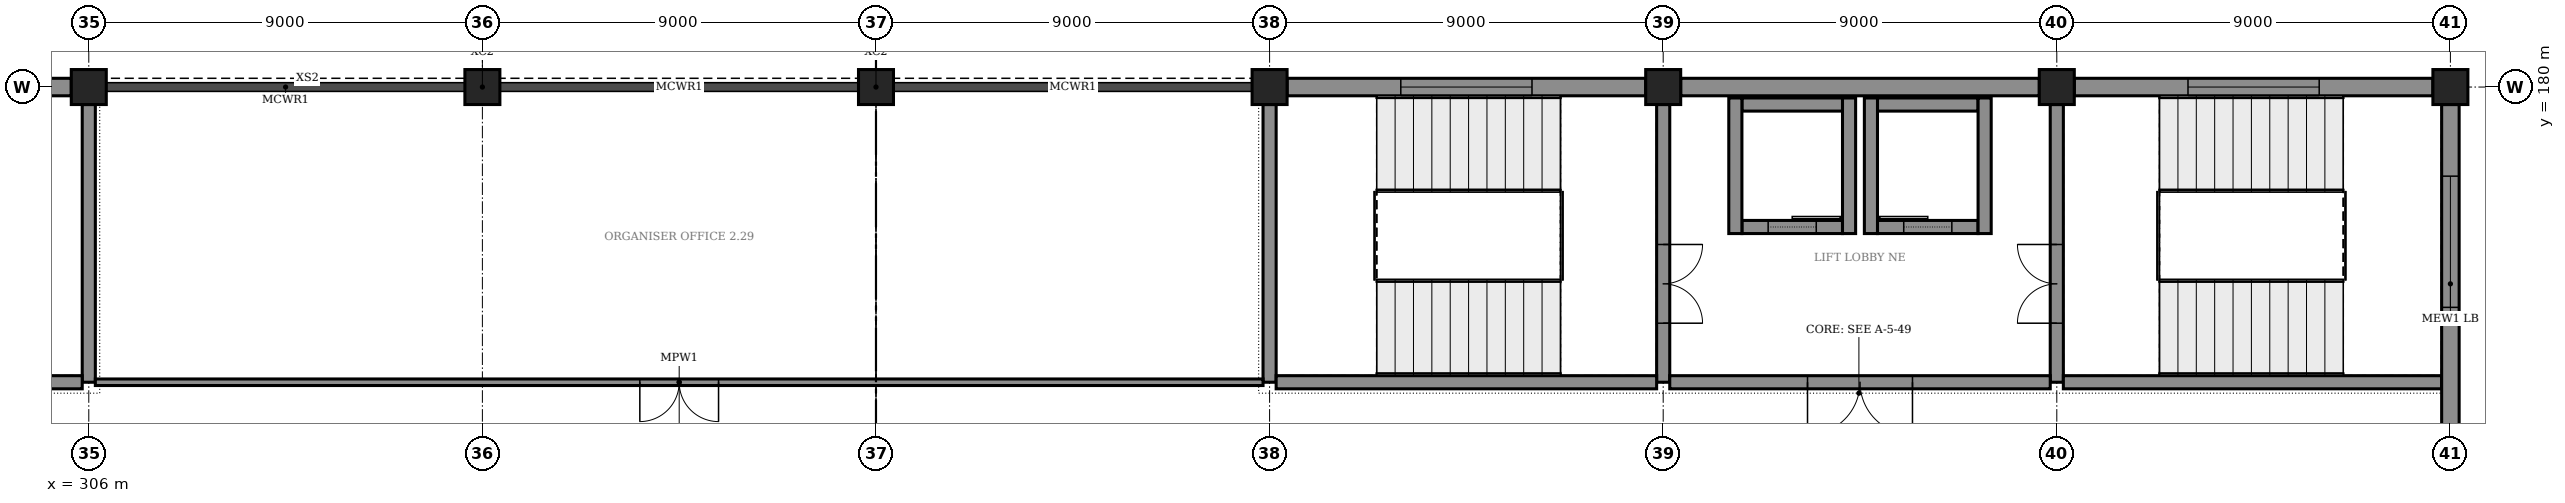
"""IFC4 building model, lengths in metres.
Left out: names, types, materials, properties, quantities, classifications, styles, units other than length and angle.
Written with IfcOpenShell. Run it as: python <this file> out.ifc"""

import sys

from ifc_helpers import new_model, si_unit, direction, frame, frame_2d, origin, origin_2d, place, context, subcontext, project, spatial, rectangle, extrude, element, fill, save


model = new_model("IFC4")
c1 = context("Model", 3, precision=1e-05, world=origin(), true_north=direction((0.0, 1.0)))
c2 = subcontext(c1, "Body", "Model", "MODEL_VIEW")
j1 = project(units=[si_unit("LENGTHUNIT", "METRE"), si_unit("PLANEANGLEUNIT", "RADIAN")], contexts=[c1])
p1 = place(None, origin())
s1 = spatial("IfcSite", under=j1, at=p1, CompositionType="ELEMENT")
p2 = place(p1, origin())
s2 = spatial("IfcBuilding", under=s1, at=p2, CompositionType="ELEMENT")
p3 = place(p2, frame((0.0, 0.0, 11.5)))
s3 = spatial("IfcBuildingStorey", under=s2, at=p3, CompositionType="ELEMENT", Elevation=11.5)
for number, where, z_axis, x_axis in (
    (1, (306.0, 180.0, 0.0), (0.0, 0.0, 1.0), (1.0, 0.0, 0.0)),
    (2, (315.0, 180.0, 0.0), (0.0, 0.0, 1.0), (1.0, 0.0, 0.0)),
    (3, (324.0, 180.0, 0.0), (0.0, 0.0, 1.0), (1.0, 0.0, 0.0)),
    (4, (333.0, 180.0, 0.0), (0.0, 0.0, 1.0), (1.0, 0.0, 0.0)),
    (5, (342.0, 180.0, 0.0), (0.0, 0.0, 1.0), (1.0, 0.0, 0.0)),
    (6, (351.0, 180.0, 0.0), (0.0, 0.0, 1.0), (1.0, 0.0, 0.0)),
    (7, (360.0, 180.0, 0.0), (0.0, 0.0, 1.0), (1.0, 0.0, 0.0)),
):
    element("IfcColumn", number, at=place(p3, frame(where, z_axis=z_axis, x_axis=x_axis)), inside=s3, PredefinedType="COLUMN", context=c2, shape_type="SweptSolid", body=[
        extrude(rectangle(XDim=0.8, YDim=0.8, at=origin_2d()), origin(), (0.0, 0.0, 1.0), 5.5),
    ])
p4 = place(p3, frame((297.4, 180.0, 0.0), z_axis=(0.0, 0.0, 1.0), x_axis=(1.0, 0.0, 0.0)))
e8 = element("IfcWall", 8, at=p4, inside=s3, PredefinedType="STANDARD", context=c2, shape_type="SweptSolid", body=[
    extrude(rectangle(XDim=8.2, YDim=0.4, at=frame_2d((4.1, 0.0))), origin(), (0.0, 0.0, 1.0), 4.32),
])
p5 = place(p4, frame((2.6, 0.0, 0.9)))
e9 = element("IfcOpeningElement", 9, at=p5, cuts=e8, PredefinedType="OPENING", context=c2, shape_type="SweptSolid", body=[
    extrude(rectangle(XDim=3.0, YDim=2.1, at=frame_2d((1.5, 1.05))), frame((0.0, 0.21, 0.0), z_axis=(0.0, -1.0, 0.0), x_axis=(1.0, 0.0, 0.0)), (0.0, 0.0, 1.0), 0.42),
])
p6 = place(p3, frame((333.4, 180.0, 0.0), z_axis=(0.0, 0.0, 1.0), x_axis=(1.0, 0.0, 0.0)))
e10 = element("IfcWall", 10, at=p6, inside=s3, PredefinedType="STANDARD", context=c2, shape_type="SweptSolid", body=[
    extrude(rectangle(XDim=8.2, YDim=0.4, at=frame_2d((4.1, 0.0))), origin(), (0.0, 0.0, 1.0), 4.32),
])
p7 = place(p6, frame((2.6, 0.0, 0.9)))
e11 = element("IfcOpeningElement", 11, at=p7, cuts=e10, PredefinedType="OPENING", context=c2, shape_type="SweptSolid", body=[
    extrude(rectangle(XDim=3.0, YDim=2.1, at=frame_2d((1.5, 1.05))), frame((0.0, 0.21, 0.0), z_axis=(0.0, -1.0, 0.0), x_axis=(1.0, 0.0, 0.0)), (0.0, 0.0, 1.0), 0.42),
])
p8 = place(p3, frame((342.4, 180.0, 0.0), z_axis=(0.0, 0.0, 1.0), x_axis=(1.0, 0.0, 0.0)))
e12 = element("IfcWall", 12, at=p8, inside=s3, PredefinedType="STANDARD", context=c2, shape_type="SweptSolid", body=[
    extrude(rectangle(XDim=8.2, YDim=0.4, at=frame_2d((4.1, 0.0))), origin(), (0.0, 0.0, 1.0), 4.32),
])
p9 = place(p3, frame((351.4, 180.0, 0.0), z_axis=(0.0, 0.0, 1.0), x_axis=(1.0, 0.0, 0.0)))
e13 = element("IfcWall", 13, at=p9, inside=s3, PredefinedType="STANDARD", context=c2, shape_type="SweptSolid", body=[
    extrude(rectangle(XDim=8.2, YDim=0.4, at=frame_2d((4.1, 0.0))), origin(), (0.0, 0.0, 1.0), 4.32),
])
p10 = place(p9, frame((2.6, 0.0, 0.9)))
e14 = element("IfcOpeningElement", 14, at=p10, cuts=e13, PredefinedType="OPENING", context=c2, shape_type="SweptSolid", body=[
    extrude(rectangle(XDim=3.0, YDim=2.1, at=frame_2d((1.5, 1.05))), frame((0.0, 0.21, 0.0), z_axis=(0.0, -1.0, 0.0), x_axis=(1.0, 0.0, 0.0)), (0.0, 0.0, 1.0), 0.42),
])
p11 = place(p3, frame((360.0, 171.4, 0.0), z_axis=(0.0, 0.0, 1.0), x_axis=(0.0, 1.0, 0.0)))
e15 = element("IfcWall", 15, at=p11, inside=s3, PredefinedType="STANDARD", context=c2, shape_type="SweptSolid", body=[
    extrude(rectangle(XDim=8.2, YDim=0.4, at=frame_2d((4.1, 0.0))), origin(), (0.0, 0.0, 1.0), 4.32),
])
p12 = place(p11, frame((3.562, 0.0, 0.9)))
e16 = element("IfcOpeningElement", 16, at=p12, cuts=e15, PredefinedType="OPENING", context=c2, shape_type="SweptSolid", body=[
    extrude(rectangle(XDim=3.0, YDim=2.1, at=frame_2d((1.5, 1.05))), frame((0.0, 0.21, 0.0), z_axis=(0.0, -1.0, 0.0), x_axis=(1.0, 0.0, 0.0)), (0.0, 0.0, 1.0), 0.42),
])
p13 = place(p3, frame((306.0, 173.25, 0.0), z_axis=(0.0, 0.0, 1.0), x_axis=(0.0, 1.0, 0.0)))
e17 = element("IfcWall", 17, at=p13, inside=s3, PredefinedType="SHEAR", context=c2, shape_type="SweptSolid", body=[
    extrude(rectangle(XDim=6.35, YDim=0.3, at=frame_2d((3.175, 0.0))), origin(), (0.0, 0.0, 1.0), 5.22),
])
p14 = place(p3, frame((297.15, 173.25, 0.0), z_axis=(0.0, 0.0, 1.0), x_axis=(1.0, 0.0, 0.0)))
e18 = element("IfcWall", 18, at=p14, inside=s3, PredefinedType="SHEAR", context=c2, shape_type="SweptSolid", body=[
    extrude(rectangle(XDim=8.7, YDim=0.3, at=frame_2d((4.35, 0.0))), origin(), (0.0, 0.0, 1.0), 5.22),
])
p15 = place(p3, frame((351.0, 173.25, 0.0), z_axis=(0.0, 0.0, 1.0), x_axis=(0.0, 1.0, 0.0)))
e19 = element("IfcWall", 19, at=p15, inside=s3, PredefinedType="SHEAR", context=c2, shape_type="SweptSolid", body=[
    extrude(rectangle(XDim=6.35, YDim=0.3, at=frame_2d((3.175, 0.0))), origin(), (0.0, 0.0, 1.0), 5.22),
])
p16 = place(p15, frame((1.35, 0.0, 0.0)))
e20 = element("IfcOpeningElement", 20, at=p16, cuts=e19, PredefinedType="OPENING", context=c2, shape_type="SweptSolid", body=[
    extrude(rectangle(XDim=1.8, YDim=2.4, at=frame_2d((0.9, 1.2))), frame((0.0, 0.16, 0.0), z_axis=(0.0, -1.0, 0.0), x_axis=(1.0, 0.0, 0.0)), (0.0, 0.0, 1.0), 0.32),
])
p17 = place(p3, frame((342.0, 173.25, 0.0), z_axis=(0.0, 0.0, 1.0), x_axis=(0.0, 1.0, 0.0)))
e21 = element("IfcWall", 21, at=p17, inside=s3, PredefinedType="SHEAR", context=c2, shape_type="SweptSolid", body=[
    extrude(rectangle(XDim=6.35, YDim=0.3, at=frame_2d((3.175, 0.0))), origin(), (0.0, 0.0, 1.0), 5.22),
])
p18 = place(p17, frame((1.35, 0.0, 0.0)))
e22 = element("IfcOpeningElement", 22, at=p18, cuts=e21, PredefinedType="OPENING", context=c2, shape_type="SweptSolid", body=[
    extrude(rectangle(XDim=1.8, YDim=2.4, at=frame_2d((0.9, 1.2))), frame((0.0, 0.16, 0.0), z_axis=(0.0, -1.0, 0.0), x_axis=(1.0, 0.0, 0.0)), (0.0, 0.0, 1.0), 0.32),
])
p19 = place(p3, frame((333.0, 173.25, 0.0), z_axis=(0.0, 0.0, 1.0), x_axis=(0.0, 1.0, 0.0)))
e23 = element("IfcWall", 23, at=p19, inside=s3, PredefinedType="SHEAR", context=c2, shape_type="SweptSolid", body=[
    extrude(rectangle(XDim=6.35, YDim=0.3, at=frame_2d((3.175, 0.0))), origin(), (0.0, 0.0, 1.0), 5.22),
])
p20 = place(p3, frame((333.15, 173.25, 0.0), z_axis=(0.0, 0.0, 1.0), x_axis=(1.0, 0.0, 0.0)))
e24 = element("IfcWall", 24, at=p20, inside=s3, PredefinedType="SHEAR", context=c2, shape_type="SweptSolid", body=[
    extrude(rectangle(XDim=8.7, YDim=0.3, at=frame_2d((4.35, 0.0))), origin(), (0.0, 0.0, 1.0), 5.22),
])
p21 = place(p3, frame((342.15, 173.25, 0.0), z_axis=(0.0, 0.0, 1.0), x_axis=(1.0, 0.0, 0.0)))
e25 = element("IfcWall", 25, at=p21, inside=s3, PredefinedType="SHEAR", context=c2, shape_type="SweptSolid", body=[
    extrude(rectangle(XDim=8.7, YDim=0.3, at=frame_2d((4.35, 0.0))), origin(), (0.0, 0.0, 1.0), 5.22),
])
p22 = place(p21, frame((3.15, 0.0, 0.0)))
e26 = element("IfcOpeningElement", 26, at=p22, cuts=e25, PredefinedType="OPENING", context=c2, shape_type="SweptSolid", body=[
    extrude(rectangle(XDim=2.4, YDim=2.4, at=frame_2d((1.2, 1.2))), frame((0.0, 0.16, 0.0), z_axis=(0.0, -1.0, 0.0), x_axis=(1.0, 0.0, 0.0)), (0.0, 0.0, 1.0), 0.32),
])
p23 = place(p3, frame((351.15, 173.25, 0.0), z_axis=(0.0, 0.0, 1.0), x_axis=(1.0, 0.0, 0.0)))
e27 = element("IfcWall", 27, at=p23, inside=s3, PredefinedType="SHEAR", context=c2, shape_type="SweptSolid", body=[
    extrude(rectangle(XDim=8.65, YDim=0.3, at=frame_2d((4.325, 0.0))), origin(), (0.0, 0.0, 1.0), 5.22),
])
for number, where, z_axis, x_axis in (
    (28, (349.35, 176.65, 0.0), (0.0, 0.0, 1.0), (0.0, 1.0, 0.0)),
    (29, (346.75, 176.65, 0.0), (0.0, 0.0, 1.0), (0.0, 1.0, 0.0)),
):
    element("IfcWall", number, at=place(p3, frame(where, z_axis=z_axis, x_axis=x_axis)), inside=s3, PredefinedType="SHEAR", context=c2, shape_type="SweptSolid", body=[
        extrude(rectangle(XDim=3.1, YDim=0.3, at=frame_2d((1.55, 0.0))), origin(), (0.0, 0.0, 1.0), 5.5),
    ])
p24 = place(p3, frame((346.9, 179.6, 0.0), z_axis=(0.0, 0.0, 1.0), x_axis=(1.0, 0.0, 0.0)))
e30 = element("IfcWall", 30, at=p24, inside=s3, PredefinedType="SHEAR", context=c2, shape_type="SweptSolid", body=[
    extrude(rectangle(XDim=2.3, YDim=0.3, at=frame_2d((1.15, 0.0))), origin(), (0.0, 0.0, 1.0), 5.5),
])
p25 = place(p3, frame((346.9, 176.8, 0.0), z_axis=(0.0, 0.0, 1.0), x_axis=(1.0, 0.0, 0.0)))
e31 = element("IfcWall", 31, at=p25, inside=s3, PredefinedType="SHEAR", context=c2, shape_type="SweptSolid", body=[
    extrude(rectangle(XDim=2.3, YDim=0.3, at=frame_2d((1.15, 0.0))), origin(), (0.0, 0.0, 1.0), 5.5),
])
p26 = place(p25, frame((0.6, 0.0, 0.0)))
e32 = element("IfcOpeningElement", 32, at=p26, cuts=e31, PredefinedType="OPENING", context=c2, shape_type="SweptSolid", body=[
    extrude(rectangle(XDim=1.1, YDim=2.2, at=frame_2d((0.55, 1.1))), frame((0.0, 0.16, 0.0), z_axis=(0.0, -1.0, 0.0), x_axis=(1.0, 0.0, 0.0)), (0.0, 0.0, 1.0), 0.32),
])
for number, where, z_axis, x_axis in (
    (33, (346.25, 176.65, 0.0), (0.0, 0.0, 1.0), (0.0, 1.0, 0.0)),
    (34, (343.65, 176.65, 0.0), (0.0, 0.0, 1.0), (0.0, 1.0, 0.0)),
):
    element("IfcWall", number, at=place(p3, frame(where, z_axis=z_axis, x_axis=x_axis)), inside=s3, PredefinedType="SHEAR", context=c2, shape_type="SweptSolid", body=[
        extrude(rectangle(XDim=3.1, YDim=0.3, at=frame_2d((1.55, 0.0))), origin(), (0.0, 0.0, 1.0), 5.5),
    ])
p27 = place(p3, frame((343.8, 179.6, 0.0), z_axis=(0.0, 0.0, 1.0), x_axis=(1.0, 0.0, 0.0)))
e35 = element("IfcWall", 35, at=p27, inside=s3, PredefinedType="SHEAR", context=c2, shape_type="SweptSolid", body=[
    extrude(rectangle(XDim=2.3, YDim=0.3, at=frame_2d((1.15, 0.0))), origin(), (0.0, 0.0, 1.0), 5.5),
])
p28 = place(p3, frame((343.8, 176.8, 0.0), z_axis=(0.0, 0.0, 1.0), x_axis=(1.0, 0.0, 0.0)))
e36 = element("IfcWall", 36, at=p28, inside=s3, PredefinedType="SHEAR", context=c2, shape_type="SweptSolid", body=[
    extrude(rectangle(XDim=2.3, YDim=0.3, at=frame_2d((1.15, 0.0))), origin(), (0.0, 0.0, 1.0), 5.5),
])
p29 = place(p28, frame((0.6, 0.0, 0.0)))
e37 = element("IfcOpeningElement", 37, at=p29, cuts=e36, PredefinedType="OPENING", context=c2, shape_type="SweptSolid", body=[
    extrude(rectangle(XDim=1.1, YDim=2.2, at=frame_2d((0.55, 1.1))), frame((0.0, 0.16, 0.0), z_axis=(0.0, -1.0, 0.0), x_axis=(1.0, 0.0, 0.0)), (0.0, 0.0, 1.0), 0.32),
])
p30 = place(p3, frame((306.15, 173.25, 0.0), z_axis=(0.0, 0.0, 1.0), x_axis=(1.0, 0.0, 0.0)))
e38 = element("IfcWall", 38, at=p30, inside=s3, PredefinedType="PARTITIONING", context=c2, shape_type="SweptSolid", body=[
    extrude(rectangle(XDim=26.7, YDim=0.15, at=frame_2d((13.35, 0.0))), origin(), (0.0, 0.0, 1.0), 4.32),
])
p31 = place(p30, frame((12.45, 0.0, 0.0)))
e39 = element("IfcOpeningElement", 39, at=p31, cuts=e38, PredefinedType="OPENING", context=c2, shape_type="SweptSolid", body=[
    extrude(rectangle(XDim=1.8, YDim=2.4, at=frame_2d((0.9, 1.2))), frame((0.0, 0.085, 0.0), z_axis=(0.0, -1.0, 0.0), x_axis=(1.0, 0.0, 0.0)), (0.0, 0.0, 1.0), 0.17),
])
p32 = place(p7, origin())
e40 = element("IfcWindow", 40, at=p32, inside=s3, PartitioningType="TRIPLE_PANEL_VERTICAL", PredefinedType="WINDOW", context=c2, shape_type="SweptSolid", body=[
    extrude(rectangle(XDim=3.0, YDim=2.1, at=frame_2d((1.5, 1.05))), frame((0.0, 0.03, 0.0), z_axis=(0.0, -1.0, 0.0), x_axis=(1.0, 0.0, 0.0)), (0.0, 0.0, 1.0), 0.06),
])
fill(e11, e40)
p33 = place(p10, origin())
e41 = element("IfcWindow", 41, at=p33, inside=s3, PartitioningType="TRIPLE_PANEL_VERTICAL", PredefinedType="WINDOW", context=c2, shape_type="SweptSolid", body=[
    extrude(rectangle(XDim=3.0, YDim=2.1, at=frame_2d((1.5, 1.05))), frame((0.0, 0.03, 0.0), z_axis=(0.0, -1.0, 0.0), x_axis=(1.0, 0.0, 0.0)), (0.0, 0.0, 1.0), 0.06),
])
fill(e14, e41)
p34 = place(p12, origin())
e42 = element("IfcWindow", 42, at=p34, inside=s3, PartitioningType="TRIPLE_PANEL_VERTICAL", PredefinedType="WINDOW", context=c2, shape_type="SweptSolid", body=[
    extrude(rectangle(XDim=3.0, YDim=2.1, at=frame_2d((1.5, 1.05))), frame((0.0, 0.03, 0.0), z_axis=(0.0, -1.0, 0.0), x_axis=(1.0, 0.0, 0.0)), (0.0, 0.0, 1.0), 0.06),
])
fill(e16, e42)
p35 = place(p16, origin())
e43 = element("IfcDoor", 43, at=p35, inside=s3, OperationType="DOUBLE_DOOR_SINGLE_SWING", PredefinedType="DOOR", context=c2, shape_type="SweptSolid", body=[
    extrude(rectangle(XDim=1.8, YDim=2.4, at=frame_2d((0.9, 1.2))), frame((0.0, 0.025, 0.0), z_axis=(0.0, -1.0, 0.0), x_axis=(1.0, 0.0, 0.0)), (0.0, 0.0, 1.0), 0.05),
])
fill(e20, e43)
p36 = place(p18, frame((1.8, 0.0, 0.0), z_axis=(0.0, 0.0, 1.0), x_axis=(-1.0, 0.0, 0.0)))
e44 = element("IfcDoor", 44, at=p36, inside=s3, OperationType="DOUBLE_DOOR_SINGLE_SWING", PredefinedType="DOOR", context=c2, shape_type="SweptSolid", body=[
    extrude(rectangle(XDim=1.8, YDim=2.4, at=frame_2d((0.9, 1.2))), frame((0.0, 0.025, 0.0), z_axis=(0.0, -1.0, 0.0), x_axis=(1.0, 0.0, 0.0)), (0.0, 0.0, 1.0), 0.05),
])
fill(e22, e44)
p37 = place(p22, frame((2.4, 0.0, 0.0), z_axis=(0.0, 0.0, 1.0), x_axis=(-1.0, 0.0, 0.0)))
e45 = element("IfcDoor", 45, at=p37, inside=s3, OperationType="DOUBLE_DOOR_SINGLE_SWING", PredefinedType="DOOR", context=c2, shape_type="SweptSolid", body=[
    extrude(rectangle(XDim=2.4, YDim=2.4, at=frame_2d((1.2, 1.2))), frame((0.0, 0.025, 0.0), z_axis=(0.0, -1.0, 0.0), x_axis=(1.0, 0.0, 0.0)), (0.0, 0.0, 1.0), 0.05),
])
fill(e26, e45)
p38 = place(p26, origin())
e46 = element("IfcDoor", 46, at=p38, inside=s3, OperationType="SLIDING_TO_LEFT", PredefinedType="DOOR", context=c2, shape_type="SweptSolid", body=[
    extrude(rectangle(XDim=1.1, YDim=2.2, at=frame_2d((0.55, 1.1))), frame((0.0, 0.025, 0.0), z_axis=(0.0, -1.0, 0.0), x_axis=(1.0, 0.0, 0.0)), (0.0, 0.0, 1.0), 0.05),
])
fill(e32, e46)
p39 = place(p29, origin())
e47 = element("IfcDoor", 47, at=p39, inside=s3, OperationType="SLIDING_TO_RIGHT", PredefinedType="DOOR", context=c2, shape_type="SweptSolid", body=[
    extrude(rectangle(XDim=1.1, YDim=2.2, at=frame_2d((0.55, 1.1))), frame((0.0, 0.025, 0.0), z_axis=(0.0, -1.0, 0.0), x_axis=(1.0, 0.0, 0.0)), (0.0, 0.0, 1.0), 0.05),
])
fill(e37, e47)
p40 = place(p31, frame((1.8, 0.0, 0.0), z_axis=(0.0, 0.0, 1.0), x_axis=(-1.0, 0.0, 0.0)))
e48 = element("IfcDoor", 48, at=p40, inside=s3, OperationType="DOUBLE_DOOR_SINGLE_SWING", PredefinedType="DOOR", context=c2, shape_type="SweptSolid", body=[
    extrude(rectangle(XDim=1.8, YDim=2.4, at=frame_2d((0.9, 1.2))), frame((0.0, 0.025, 0.0), z_axis=(0.0, -1.0, 0.0), x_axis=(1.0, 0.0, 0.0)), (0.0, 0.0, 1.0), 0.05),
])
fill(e39, e48)
save(model, sys.argv[1])
